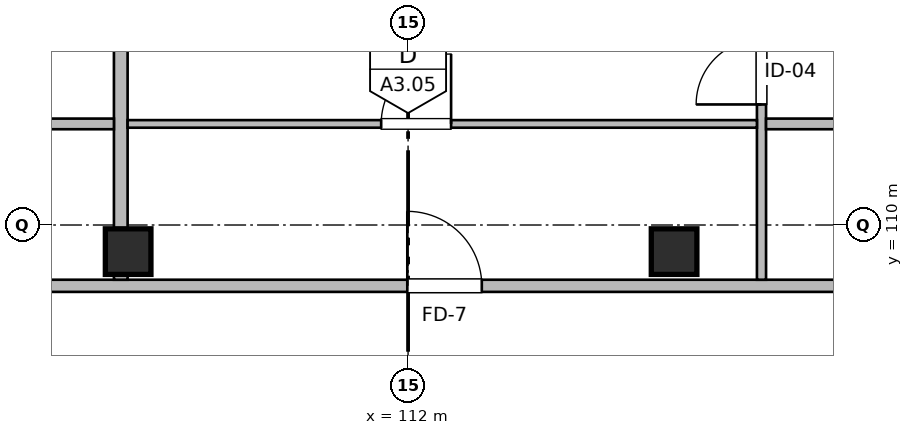
"""IFC4 building model, lengths in metres.
Left out: names, types, materials, properties, quantities, classifications, styles, units other than length and angle.
Written with IfcOpenShell. Run it as: python <this file> out.ifc"""

import sys

from ifc_helpers import new_model, si_unit, direction, frame, frame_2d, origin, origin_2d, place, context, subcontext, project, spatial, rectangle, extrude, element, fill, save


model = new_model("IFC4")
c1 = context("Model", 3, precision=1e-05, world=origin(), true_north=direction((0.0, 1.0)))
c2 = subcontext(c1, "Body", "Model", "MODEL_VIEW")
j1 = project(units=[si_unit("LENGTHUNIT", "METRE"), si_unit("PLANEANGLEUNIT", "RADIAN")], contexts=[c1])
p1 = place(None, origin())
s1 = spatial("IfcSite", under=j1, at=p1, CompositionType="ELEMENT")
p2 = place(p1, origin())
s2 = spatial("IfcBuilding", under=s1, at=p2, CompositionType="ELEMENT")
p3 = place(p2, frame((0.0, 0.0, 16.96)))
s3 = spatial("IfcBuildingStorey", under=s2, at=p3, CompositionType="ELEMENT", Elevation=16.96)
for number, where, z_axis, x_axis in (
    (1, (108.317, 109.65, 0.0), (0.0, 0.0, 1.0), (1.0, 0.0, 0.0)),
    (2, (115.5, 109.65, 0.0), (0.0, 0.0, 1.0), (1.0, 0.0, 0.0)),
):
    element("IfcColumn", number, at=place(p3, frame(where, z_axis=z_axis, x_axis=x_axis)), inside=s3, PredefinedType="COLUMN", context=c2, shape_type="SweptSolid", body=[
        extrude(rectangle(XDim=0.6, YDim=0.6, at=origin_2d()), origin(), (0.0, 0.0, 1.0), 3.2),
    ])
p4 = place(p3, frame((93.66, 109.2, 0.0), z_axis=(0.0, 0.0, 1.0), x_axis=(1.0, 0.0, 0.0)))
e3 = element("IfcWall", 3, at=p4, inside=s3, PredefinedType="PARTITIONING", context=c2, shape_type="SweptSolid", body=[
    extrude(rectangle(XDim=43.68, YDim=0.16, at=frame_2d((21.84, 0.0))), origin(), (0.0, 0.0, 1.0), 2.935),
])
p5 = place(p4, frame((3.705, 0.0, 0.0)))
e4 = element("IfcOpeningElement", 4, at=p5, cuts=e3, PredefinedType="OPENING", context=c2, shape_type="SweptSolid", body=[
    extrude(rectangle(XDim=0.98, YDim=2.15, at=frame_2d((0.49, 1.075))), frame((0.0, 0.09, 0.0), z_axis=(0.0, -1.0, 0.0), x_axis=(1.0, 0.0, 0.0)), (0.0, 0.0, 1.0), 0.18),
])
p6 = place(p4, frame((18.33, 0.0, 0.0)))
e5 = element("IfcOpeningElement", 5, at=p6, cuts=e3, PredefinedType="OPENING", context=c2, shape_type="SweptSolid", body=[
    extrude(rectangle(XDim=0.98, YDim=2.15, at=frame_2d((0.49, 1.075))), frame((0.0, 0.09, 0.0), z_axis=(0.0, -1.0, 0.0), x_axis=(1.0, 0.0, 0.0)), (0.0, 0.0, 1.0), 0.18),
])
p7 = place(p4, frame((32.915, 0.0, 0.0)))
e6 = element("IfcOpeningElement", 6, at=p7, cuts=e3, PredefinedType="OPENING", context=c2, shape_type="SweptSolid", body=[
    extrude(rectangle(XDim=0.98, YDim=2.15, at=frame_2d((0.49, 1.075))), frame((0.0, 0.09, 0.0), z_axis=(0.0, -1.0, 0.0), x_axis=(1.0, 0.0, 0.0)), (0.0, 0.0, 1.0), 0.18),
])
p8 = place(p3, frame((108.22, 109.28, 0.0), z_axis=(0.0, 0.0, 1.0), x_axis=(0.0, 1.0, 0.0)))
e7 = element("IfcWall", 7, at=p8, inside=s3, PredefinedType="PARTITIONING", context=c2, shape_type="SweptSolid", body=[
    extrude(rectangle(XDim=6.6, YDim=0.18, at=frame_2d((3.3, 0.0))), origin(), (0.0, 0.0, 1.0), 2.68),
])
p9 = place(p3, frame((102.11, 111.33, 0.0), z_axis=(0.0, 0.0, 1.0), x_axis=(1.0, 0.0, 0.0)))
e8 = element("IfcWall", 8, at=p9, inside=s3, PredefinedType="PARTITIONING", context=c2, shape_type="SweptSolid", body=[
    extrude(rectangle(XDim=6.02, YDim=0.14, at=frame_2d((3.01, 0.0))), origin(), (0.0, 0.0, 1.0), 2.935),
])
p10 = place(p9, frame((2.432, 0.0, 0.0)))
e9 = element("IfcOpeningElement", 9, at=p10, cuts=e8, PredefinedType="OPENING", context=c2, shape_type="SweptSolid", body=[
    extrude(rectangle(XDim=0.85, YDim=2.05, at=frame_2d((0.425, 1.025))), frame((0.0, 0.08, 0.0), z_axis=(0.0, -1.0, 0.0), x_axis=(1.0, 0.0, 0.0)), (0.0, 0.0, 1.0), 0.16),
])
p11 = place(p3, frame((116.65, 109.28, 0.0), z_axis=(0.0, 0.0, 1.0), x_axis=(0.0, 1.0, 0.0)))
e10 = element("IfcWall", 10, at=p11, inside=s3, PredefinedType="PARTITIONING", context=c2, shape_type="SweptSolid", body=[
    extrude(rectangle(XDim=6.6, YDim=0.12, at=frame_2d((3.3, 0.0))), origin(), (0.0, 0.0, 1.0), 2.935),
])
p12 = place(p11, frame((2.306, 0.0, 0.0)))
e11 = element("IfcOpeningElement", 11, at=p12, cuts=e10, PredefinedType="OPENING", context=c2, shape_type="SweptSolid", body=[
    extrude(rectangle(XDim=0.86, YDim=2.1, at=frame_2d((0.43, 1.05))), frame((0.0, 0.07, 0.0), z_axis=(0.0, -1.0, 0.0), x_axis=(1.0, 0.0, 0.0)), (0.0, 0.0, 1.0), 0.14),
])
p13 = place(p11, frame((4.097, 0.0, 0.0)))
e12 = element("IfcOpeningElement", 12, at=p13, cuts=e10, PredefinedType="OPENING", context=c2, shape_type="SweptSolid", body=[
    extrude(rectangle(XDim=0.9, YDim=2.1, at=frame_2d((0.45, 1.05))), frame((0.0, 0.07, 0.0), z_axis=(0.0, -1.0, 0.0), x_axis=(1.0, 0.0, 0.0)), (0.0, 0.0, 1.0), 0.14),
])
p14 = place(p3, frame((116.71, 111.33, 0.0), z_axis=(0.0, 0.0, 1.0), x_axis=(1.0, 0.0, 0.0)))
e13 = element("IfcWall", 13, at=p14, inside=s3, PredefinedType="PARTITIONING", context=c2, shape_type="SweptSolid", body=[
    extrude(rectangle(XDim=5.98, YDim=0.14, at=frame_2d((2.99, 0.0))), origin(), (0.0, 0.0, 1.0), 2.935),
])
p15 = place(p14, frame((2.416, 0.0, 0.0)))
e14 = element("IfcOpeningElement", 14, at=p15, cuts=e13, PredefinedType="OPENING", context=c2, shape_type="SweptSolid", body=[
    extrude(rectangle(XDim=0.85, YDim=2.05, at=frame_2d((0.425, 1.025))), frame((0.0, 0.08, 0.0), z_axis=(0.0, -1.0, 0.0), x_axis=(1.0, 0.0, 0.0)), (0.0, 0.0, 1.0), 0.16),
])
p16 = place(p3, frame((108.31, 111.33, 0.0), z_axis=(0.0, 0.0, 1.0), x_axis=(1.0, 0.0, 0.0)))
e15 = element("IfcWall", 15, at=p16, inside=s3, PredefinedType="PARTITIONING", context=c2, shape_type="SweptSolid", body=[
    extrude(rectangle(XDim=8.28, YDim=0.1, at=frame_2d((4.14, 0.0))), origin(), (0.0, 0.0, 1.0), 2.935),
])
p17 = place(p16, frame((3.336, 0.0, 0.0)))
e16 = element("IfcOpeningElement", 16, at=p17, cuts=e15, PredefinedType="OPENING", context=c2, shape_type="SweptSolid", body=[
    extrude(rectangle(XDim=0.92, YDim=2.1, at=frame_2d((0.46, 1.05))), frame((0.0, 0.06, 0.0), z_axis=(0.0, -1.0, 0.0), x_axis=(1.0, 0.0, 0.0)), (0.0, 0.0, 1.0), 0.12),
])
p18 = place(p6, origin())
e17 = element("IfcDoor", 17, at=p18, inside=s3, OperationType="SINGLE_SWING_LEFT", PredefinedType="DOOR", context=c2, shape_type="SweptSolid", body=[
    extrude(rectangle(XDim=0.98, YDim=2.15, at=frame_2d((0.49, 1.075))), frame((0.0, 0.025, 0.0), z_axis=(0.0, -1.0, 0.0), x_axis=(1.0, 0.0, 0.0)), (0.0, 0.0, 1.0), 0.05),
])
fill(e5, e17)
p19 = place(p17, origin())
e18 = element("IfcDoor", 18, at=p19, inside=s3, OperationType="SINGLE_SWING_RIGHT", PredefinedType="DOOR", context=c2, shape_type="SweptSolid", body=[
    extrude(rectangle(XDim=0.92, YDim=2.1, at=frame_2d((0.46, 1.05))), frame((0.0, 0.025, 0.0), z_axis=(0.0, -1.0, 0.0), x_axis=(1.0, 0.0, 0.0)), (0.0, 0.0, 1.0), 0.05),
])
fill(e16, e18)
p20 = place(p12, origin())
e19 = element("IfcDoor", 19, at=p20, inside=s3, OperationType="SINGLE_SWING_LEFT", PredefinedType="DOOR", context=c2, shape_type="SweptSolid", body=[
    extrude(rectangle(XDim=0.86, YDim=2.1, at=frame_2d((0.43, 1.05))), frame((0.0, 0.025, 0.0), z_axis=(0.0, -1.0, 0.0), x_axis=(1.0, 0.0, 0.0)), (0.0, 0.0, 1.0), 0.05),
])
fill(e11, e19)
save(model, sys.argv[1])
